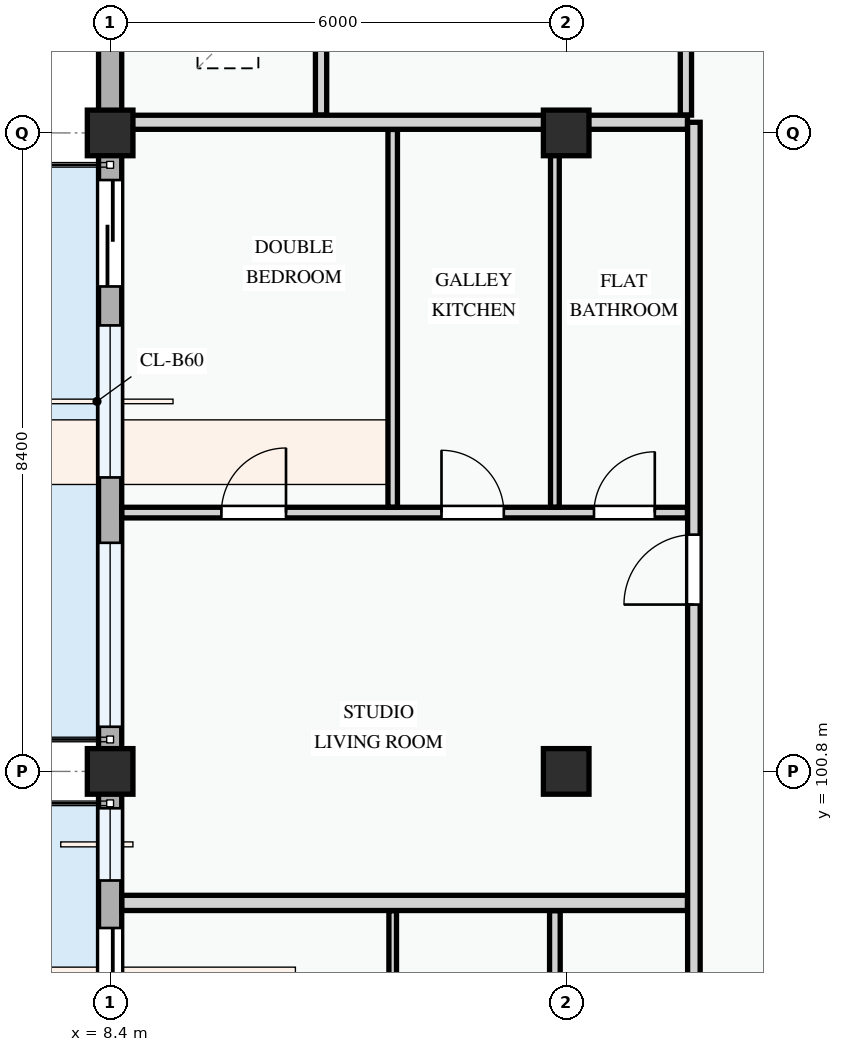
"""IFC4 building model, lengths in metres.
Left out: names, types, materials, properties, quantities, classifications, styles, units other than length and angle.
Written with IfcOpenShell. Run it as: python <this file> out.ifc"""

import sys

from ifc_helpers import new_model, si_unit, direction, frame, frame_2d, origin, origin_2d, place, context, subcontext, project, spatial, rectangle, extrude, element, fill, save


model = new_model("IFC4")
c1 = context("Model", 3, precision=1e-05, world=origin(), true_north=direction((0.0, 1.0)))
c2 = subcontext(c1, "Body", "Model", "MODEL_VIEW")
j1 = project(units=[si_unit("LENGTHUNIT", "METRE"), si_unit("PLANEANGLEUNIT", "RADIAN")], contexts=[c1])
p1 = place(None, origin())
s1 = spatial("IfcSite", under=j1, at=p1, CompositionType="ELEMENT")
p2 = place(p1, origin())
s2 = spatial("IfcBuilding", under=s1, at=p2, CompositionType="ELEMENT")
p3 = place(p2, frame((0.0, 0.0, 24.6)))
s3 = spatial("IfcBuildingStorey", under=s2, at=p3, CompositionType="ELEMENT", Elevation=24.6)
for number, where, z_axis, x_axis in (
    (1, (8.4, 100.8, 0.0), (0.0, 0.0, 1.0), (1.0, 0.0, 0.0)),
    (2, (8.4, 109.2, 0.0), (0.0, 0.0, 1.0), (1.0, 0.0, 0.0)),
    (3, (14.4, 100.8, 0.0), (0.0, 0.0, 1.0), (1.0, 0.0, 0.0)),
    (4, (14.4, 109.2, 0.0), (0.0, 0.0, 1.0), (1.0, 0.0, 0.0)),
):
    element("IfcColumn", number, at=place(p3, frame(where, z_axis=z_axis, x_axis=x_axis)), inside=s3, PredefinedType="COLUMN", context=c2, shape_type="SweptSolid", body=[
        extrude(rectangle(XDim=0.6, YDim=0.6, at=origin_2d()), origin(), (0.0, 0.0, 1.0), 3.3),
    ])
p4 = place(p3, frame((8.4, 115.2, 0.0), z_axis=(0.0, 0.0, 1.0), x_axis=(0.0, -1.0, 0.0)))
e5 = element("IfcWall", 5, at=p4, inside=s3, PredefinedType="STANDARD", context=c2, shape_type="SweptSolid", body=[
    extrude(rectangle(XDim=6.0, YDim=0.305, at=frame_2d((3.0, 0.0))), origin(), (0.0, 0.0, 1.0), 2.575),
])
p5 = place(p4, frame((0.545, 0.0, 0.78)))
e6 = element("IfcOpeningElement", 6, at=p5, cuts=e5, PredefinedType="OPENING", context=c2, shape_type="SweptSolid", body=[
    extrude(rectangle(XDim=0.9, YDim=1.2, at=frame_2d((0.45, 0.6))), frame((0.0, 0.163, 0.0), z_axis=(0.0, -1.0, 0.0), x_axis=(1.0, 0.0, 0.0)), (0.0, 0.0, 1.0), 0.325),
])
p6 = place(p4, frame((3.33, 0.0, 0.78)))
e7 = element("IfcOpeningElement", 7, at=p6, cuts=e5, PredefinedType="OPENING", context=c2, shape_type="SweptSolid", body=[
    extrude(rectangle(XDim=0.95, YDim=1.15, at=frame_2d((0.475, 0.575))), frame((0.0, 0.163, 0.0), z_axis=(0.0, -1.0, 0.0), x_axis=(1.0, 0.0, 0.0)), (0.0, 0.0, 1.0), 0.325),
])
p7 = place(p3, frame((8.4, 109.2, 0.0), z_axis=(0.0, 0.0, 1.0), x_axis=(0.0, -1.0, 0.0)))
e8 = element("IfcWall", 8, at=p7, inside=s3, PredefinedType="STANDARD", context=c2, shape_type="SweptSolid", body=[
    extrude(rectangle(XDim=8.4, YDim=0.305, at=frame_2d((4.2, 0.0))), origin(), (0.0, 0.0, 1.0), 2.425),
])
p8 = place(p7, frame((0.62, 0.0, 0.0)))
e9 = element("IfcOpeningElement", 9, at=p8, cuts=e8, PredefinedType="OPENING", context=c2, shape_type="SweptSolid", body=[
    extrude(rectangle(XDim=1.4, YDim=2.2, at=frame_2d((0.7, 1.1))), frame((0.0, 0.163, 0.0), z_axis=(0.0, -1.0, 0.0), x_axis=(1.0, 0.0, 0.0)), (0.0, 0.0, 1.0), 0.325),
])
p9 = place(p7, frame((2.532, 0.0, 0.78)))
e10 = element("IfcOpeningElement", 10, at=p9, cuts=e8, PredefinedType="OPENING", context=c2, shape_type="SweptSolid", body=[
    extrude(rectangle(XDim=2.0, YDim=1.5, at=frame_2d((1.0, 0.75))), frame((0.0, 0.163, 0.0), z_axis=(0.0, -1.0, 0.0), x_axis=(1.0, 0.0, 0.0)), (0.0, 0.0, 1.0), 0.325),
])
p10 = place(p7, frame((5.393, 0.0, 0.78)))
e11 = element("IfcOpeningElement", 11, at=p10, cuts=e8, PredefinedType="OPENING", context=c2, shape_type="SweptSolid", body=[
    extrude(rectangle(XDim=2.42, YDim=1.52, at=frame_2d((1.21, 0.76))), frame((0.0, 0.163, 0.0), z_axis=(0.0, -1.0, 0.0), x_axis=(1.0, 0.0, 0.0)), (0.0, 0.0, 1.0), 0.325),
])
p11 = place(p3, frame((8.4, 100.8, 0.0), z_axis=(0.0, 0.0, 1.0), x_axis=(0.0, -1.0, 0.0)))
e12 = element("IfcWall", 12, at=p11, inside=s3, PredefinedType="STANDARD", context=c2, shape_type="SweptSolid", body=[
    extrude(rectangle(XDim=6.0, YDim=0.305, at=frame_2d((3.0, 0.0))), origin(), (0.0, 0.0, 1.0), 2.575),
])
p12 = place(p11, frame((2.06, 0.0, 0.0)))
e13 = element("IfcOpeningElement", 13, at=p12, cuts=e12, PredefinedType="OPENING", context=c2, shape_type="SweptSolid", body=[
    extrude(rectangle(XDim=1.5, YDim=2.2, at=frame_2d((0.75, 1.1))), frame((0.0, 0.163, 0.0), z_axis=(0.0, -1.0, 0.0), x_axis=(1.0, 0.0, 0.0)), (0.0, 0.0, 1.0), 0.325),
])
p13 = place(p11, frame((0.485, 0.0, 0.78)))
e14 = element("IfcOpeningElement", 14, at=p13, cuts=e12, PredefinedType="OPENING", context=c2, shape_type="SweptSolid", body=[
    extrude(rectangle(XDim=0.95, YDim=1.15, at=frame_2d((0.475, 0.575))), frame((0.0, 0.163, 0.0), z_axis=(0.0, -1.0, 0.0), x_axis=(1.0, 0.0, 0.0)), (0.0, 0.0, 1.0), 0.325),
])
p14 = place(p11, frame((4.235, 0.0, 0.78)))
e15 = element("IfcOpeningElement", 15, at=p14, cuts=e12, PredefinedType="OPENING", context=c2, shape_type="SweptSolid", body=[
    extrude(rectangle(XDim=0.95, YDim=1.15, at=frame_2d((0.475, 0.575))), frame((0.0, 0.163, 0.0), z_axis=(0.0, -1.0, 0.0), x_axis=(1.0, 0.0, 0.0)), (0.0, 0.0, 1.0), 0.325),
])
for number, where, z_axis, x_axis in (
    (16, (11.175, 113.324, 0.0), (0.0, 0.0, 1.0), (0.0, -1.0, 0.0)),
    (17, (15.975, 113.324, 0.0), (0.0, 0.0, 1.0), (0.0, -1.0, 0.0)),
):
    element("IfcWall", number, at=place(p3, frame(where, z_axis=z_axis, x_axis=x_axis)), inside=s3, PredefinedType="PARTITIONING", context=c2, shape_type="SweptSolid", body=[
        extrude(rectangle(XDim=3.889, YDim=0.148, at=frame_2d((1.945, 0.0))), origin(), (0.0, 0.0, 1.0), 3.0),
    ])
p15 = place(p3, frame((12.118, 92.824, 0.0), z_axis=(0.0, 0.0, 1.0), x_axis=(0.0, 1.0, 0.0)))
e18 = element("IfcWall", 18, at=p15, inside=s3, PredefinedType="PARTITIONING", context=c2, shape_type="SweptSolid", body=[
    extrude(rectangle(XDim=6.144, YDim=0.1, at=frame_2d((3.072, 0.0))), origin(), (0.0, 0.0, 1.0), 3.0),
])
p16 = place(p3, frame((14.251, 92.824, 0.0), z_axis=(0.0, 0.0, 1.0), x_axis=(0.0, 1.0, 0.0)))
e19 = element("IfcWall", 19, at=p16, inside=s3, PredefinedType="PARTITIONING", context=c2, shape_type="SweptSolid", body=[
    extrude(rectangle(XDim=6.144, YDim=0.14, at=frame_2d((3.072, 0.0))), origin(), (0.0, 0.0, 1.0), 2.425),
])
p17 = place(p3, frame((8.554, 104.205, 0.0), z_axis=(0.0, 0.0, 1.0), x_axis=(1.0, 0.0, 0.0)))
e20 = element("IfcWall", 20, at=p17, inside=s3, PredefinedType="PARTITIONING", context=c2, shape_type="SweptSolid", body=[
    extrude(rectangle(XDim=7.441, YDim=0.14, at=frame_2d((3.721, 0.0))), origin(), (0.0, 0.0, 1.0), 3.0),
])
p18 = place(p17, frame((1.309, 0.0, 0.0)))
e21 = element("IfcOpeningElement", 21, at=p18, cuts=e20, PredefinedType="OPENING", context=c2, shape_type="SweptSolid", body=[
    extrude(rectangle(XDim=0.85, YDim=2.1, at=frame_2d((0.425, 1.05))), frame((0.0, 0.08, 0.0), z_axis=(0.0, -1.0, 0.0), x_axis=(1.0, 0.0, 0.0)), (0.0, 0.0, 1.0), 0.16),
])
p19 = place(p17, frame((4.205, 0.0, 0.0)))
e22 = element("IfcOpeningElement", 22, at=p19, cuts=e20, PredefinedType="OPENING", context=c2, shape_type="SweptSolid", body=[
    extrude(rectangle(XDim=0.82, YDim=2.08, at=frame_2d((0.41, 1.04))), frame((0.0, 0.08, 0.0), z_axis=(0.0, -1.0, 0.0), x_axis=(1.0, 0.0, 0.0)), (0.0, 0.0, 1.0), 0.16),
])
p20 = place(p17, frame((6.211, 0.0, 0.0)))
e23 = element("IfcOpeningElement", 23, at=p20, cuts=e20, PredefinedType="OPENING", context=c2, shape_type="SweptSolid", body=[
    extrude(rectangle(XDim=0.8, YDim=2.1, at=frame_2d((0.4, 1.05))), frame((0.0, 0.08, 0.0), z_axis=(0.0, -1.0, 0.0), x_axis=(1.0, 0.0, 0.0)), (0.0, 0.0, 1.0), 0.16),
])
p21 = place(p3, frame((12.118, 104.277, 0.0), z_axis=(0.0, 0.0, 1.0), x_axis=(0.0, 1.0, 0.0)))
e24 = element("IfcWall", 24, at=p21, inside=s3, PredefinedType="PARTITIONING", context=c2, shape_type="SweptSolid", body=[
    extrude(rectangle(XDim=4.969, YDim=0.125, at=frame_2d((2.484, 0.0))), origin(), (0.0, 0.0, 1.0), 3.0),
])
p22 = place(p3, frame((14.251, 104.277, 0.0), z_axis=(0.0, 0.0, 1.0), x_axis=(0.0, 1.0, 0.0)))
e25 = element("IfcWall", 25, at=p22, inside=s3, PredefinedType="PARTITIONING", context=c2, shape_type="SweptSolid", body=[
    extrude(rectangle(XDim=4.969, YDim=0.115, at=frame_2d((2.484, 0.0))), origin(), (0.0, 0.0, 1.0), 2.425),
])
p23 = place(p3, frame((8.554, 99.07, 0.0), z_axis=(0.0, 0.0, 1.0), x_axis=(1.0, 0.0, 0.0)))
e26 = element("IfcWall", 26, at=p23, inside=s3, PredefinedType="PARTITIONING", context=c2, shape_type="SweptSolid", body=[
    extrude(rectangle(XDim=7.441, YDim=0.2, at=frame_2d((3.721, 0.0))), origin(), (0.0, 0.0, 1.0), 3.0),
])
p24 = place(p3, frame((8.554, 109.34, 0.0), z_axis=(0.0, 0.0, 1.0), x_axis=(1.0, 0.0, 0.0)))
e27 = element("IfcWall", 27, at=p24, inside=s3, PredefinedType="PARTITIONING", context=c2, shape_type="SweptSolid", body=[
    extrude(rectangle(XDim=7.441, YDim=0.185, at=frame_2d((3.721, 0.0))), origin(), (0.0, 0.0, 1.0), 2.375),
])
p25 = place(p3, frame((16.08, 86.46, 0.0), z_axis=(0.0, 0.0, 1.0), x_axis=(0.0, 1.0, 0.0)))
e28 = element("IfcWall", 28, at=p25, inside=s3, PredefinedType="PARTITIONING", context=c2, shape_type="SweptSolid", body=[
    extrude(rectangle(XDim=22.88, YDim=0.165, at=frame_2d((11.44, 0.0))), origin(), (0.0, 0.0, 1.0), 3.0),
])
p26 = place(p25, frame((3.732, 0.0, 0.0)))
e29 = element("IfcOpeningElement", 29, at=p26, cuts=e28, PredefinedType="OPENING", context=c2, shape_type="SweptSolid", body=[
    extrude(rectangle(XDim=0.92, YDim=2.1, at=frame_2d((0.46, 1.05))), frame((0.0, 0.093, 0.0), z_axis=(0.0, -1.0, 0.0), x_axis=(1.0, 0.0, 0.0)), (0.0, 0.0, 1.0), 0.185),
])
p27 = place(p25, frame((16.535, 0.0, 0.0)))
e30 = element("IfcOpeningElement", 30, at=p27, cuts=e28, PredefinedType="OPENING", context=c2, shape_type="SweptSolid", body=[
    extrude(rectangle(XDim=0.92, YDim=2.1, at=frame_2d((0.46, 1.05))), frame((0.0, 0.093, 0.0), z_axis=(0.0, -1.0, 0.0), x_axis=(1.0, 0.0, 0.0)), (0.0, 0.0, 1.0), 0.185),
])
p28 = place(p8, frame((1.4, 0.0, 0.0), z_axis=(0.0, 0.0, 1.0), x_axis=(-1.0, 0.0, 0.0)))
e31 = element("IfcDoor", 31, at=p28, inside=s3, OperationType="SLIDING_TO_LEFT", PredefinedType="DOOR", context=c2, shape_type="SweptSolid", body=[
    extrude(rectangle(XDim=1.4, YDim=2.2, at=frame_2d((0.7, 1.1))), frame((0.0, 0.025, 0.0), z_axis=(0.0, -1.0, 0.0), x_axis=(1.0, 0.0, 0.0)), (0.0, 0.0, 1.0), 0.05),
])
fill(e9, e31)
p29 = place(p9, origin())
e32 = element("IfcWindow", 32, at=p29, inside=s3, PartitioningType="DOUBLE_PANEL_VERTICAL", PredefinedType="WINDOW", context=c2, shape_type="SweptSolid", body=[
    extrude(rectangle(XDim=2.0, YDim=1.5, at=frame_2d((1.0, 0.75))), frame((0.0, 0.03, 0.0), z_axis=(0.0, -1.0, 0.0), x_axis=(1.0, 0.0, 0.0)), (0.0, 0.0, 1.0), 0.06),
])
fill(e10, e32)
p30 = place(p10, origin())
e33 = element("IfcWindow", 33, at=p30, inside=s3, PartitioningType="DOUBLE_PANEL_VERTICAL", PredefinedType="WINDOW", context=c2, shape_type="SweptSolid", body=[
    extrude(rectangle(XDim=2.42, YDim=1.52, at=frame_2d((1.21, 0.76))), frame((0.0, 0.03, 0.0), z_axis=(0.0, -1.0, 0.0), x_axis=(1.0, 0.0, 0.0)), (0.0, 0.0, 1.0), 0.06),
])
fill(e11, e33)
p31 = place(p12, frame((1.5, 0.0, 0.0), z_axis=(0.0, 0.0, 1.0), x_axis=(-1.0, 0.0, 0.0)))
e34 = element("IfcDoor", 34, at=p31, inside=s3, OperationType="SLIDING_TO_RIGHT", PredefinedType="DOOR", context=c2, shape_type="SweptSolid", body=[
    extrude(rectangle(XDim=1.5, YDim=2.2, at=frame_2d((0.75, 1.1))), frame((0.0, 0.025, 0.0), z_axis=(0.0, -1.0, 0.0), x_axis=(1.0, 0.0, 0.0)), (0.0, 0.0, 1.0), 0.05),
])
fill(e13, e34)
p32 = place(p13, origin())
e35 = element("IfcWindow", 35, at=p32, inside=s3, PartitioningType="SINGLE_PANEL", PredefinedType="WINDOW", context=c2, shape_type="SweptSolid", body=[
    extrude(rectangle(XDim=0.95, YDim=1.15, at=frame_2d((0.475, 0.575))), frame((0.0, 0.03, 0.0), z_axis=(0.0, -1.0, 0.0), x_axis=(1.0, 0.0, 0.0)), (0.0, 0.0, 1.0), 0.06),
])
fill(e14, e35)
p33 = place(p18, origin())
e36 = element("IfcDoor", 36, at=p33, inside=s3, OperationType="SINGLE_SWING_RIGHT", PredefinedType="DOOR", context=c2, shape_type="SweptSolid", body=[
    extrude(rectangle(XDim=0.85, YDim=2.1, at=frame_2d((0.425, 1.05))), frame((0.0, 0.025, 0.0), z_axis=(0.0, -1.0, 0.0), x_axis=(1.0, 0.0, 0.0)), (0.0, 0.0, 1.0), 0.05),
])
fill(e21, e36)
p34 = place(p19, origin())
e37 = element("IfcDoor", 37, at=p34, inside=s3, OperationType="SINGLE_SWING_LEFT", PredefinedType="DOOR", context=c2, shape_type="SweptSolid", body=[
    extrude(rectangle(XDim=0.82, YDim=2.08, at=frame_2d((0.41, 1.04))), frame((0.0, 0.025, 0.0), z_axis=(0.0, -1.0, 0.0), x_axis=(1.0, 0.0, 0.0)), (0.0, 0.0, 1.0), 0.05),
])
fill(e22, e37)
p35 = place(p20, origin())
e38 = element("IfcDoor", 38, at=p35, inside=s3, OperationType="SINGLE_SWING_RIGHT", PredefinedType="DOOR", context=c2, shape_type="SweptSolid", body=[
    extrude(rectangle(XDim=0.8, YDim=2.1, at=frame_2d((0.4, 1.05))), frame((0.0, 0.025, 0.0), z_axis=(0.0, -1.0, 0.0), x_axis=(1.0, 0.0, 0.0)), (0.0, 0.0, 1.0), 0.05),
])
fill(e23, e38)
p36 = place(p27, origin())
e39 = element("IfcDoor", 39, at=p36, inside=s3, OperationType="SINGLE_SWING_LEFT", PredefinedType="DOOR", context=c2, shape_type="SweptSolid", body=[
    extrude(rectangle(XDim=0.92, YDim=2.1, at=frame_2d((0.46, 1.05))), frame((0.0, 0.025, 0.0), z_axis=(0.0, -1.0, 0.0), x_axis=(1.0, 0.0, 0.0)), (0.0, 0.0, 1.0), 0.05),
])
fill(e30, e39)
save(model, sys.argv[1])
